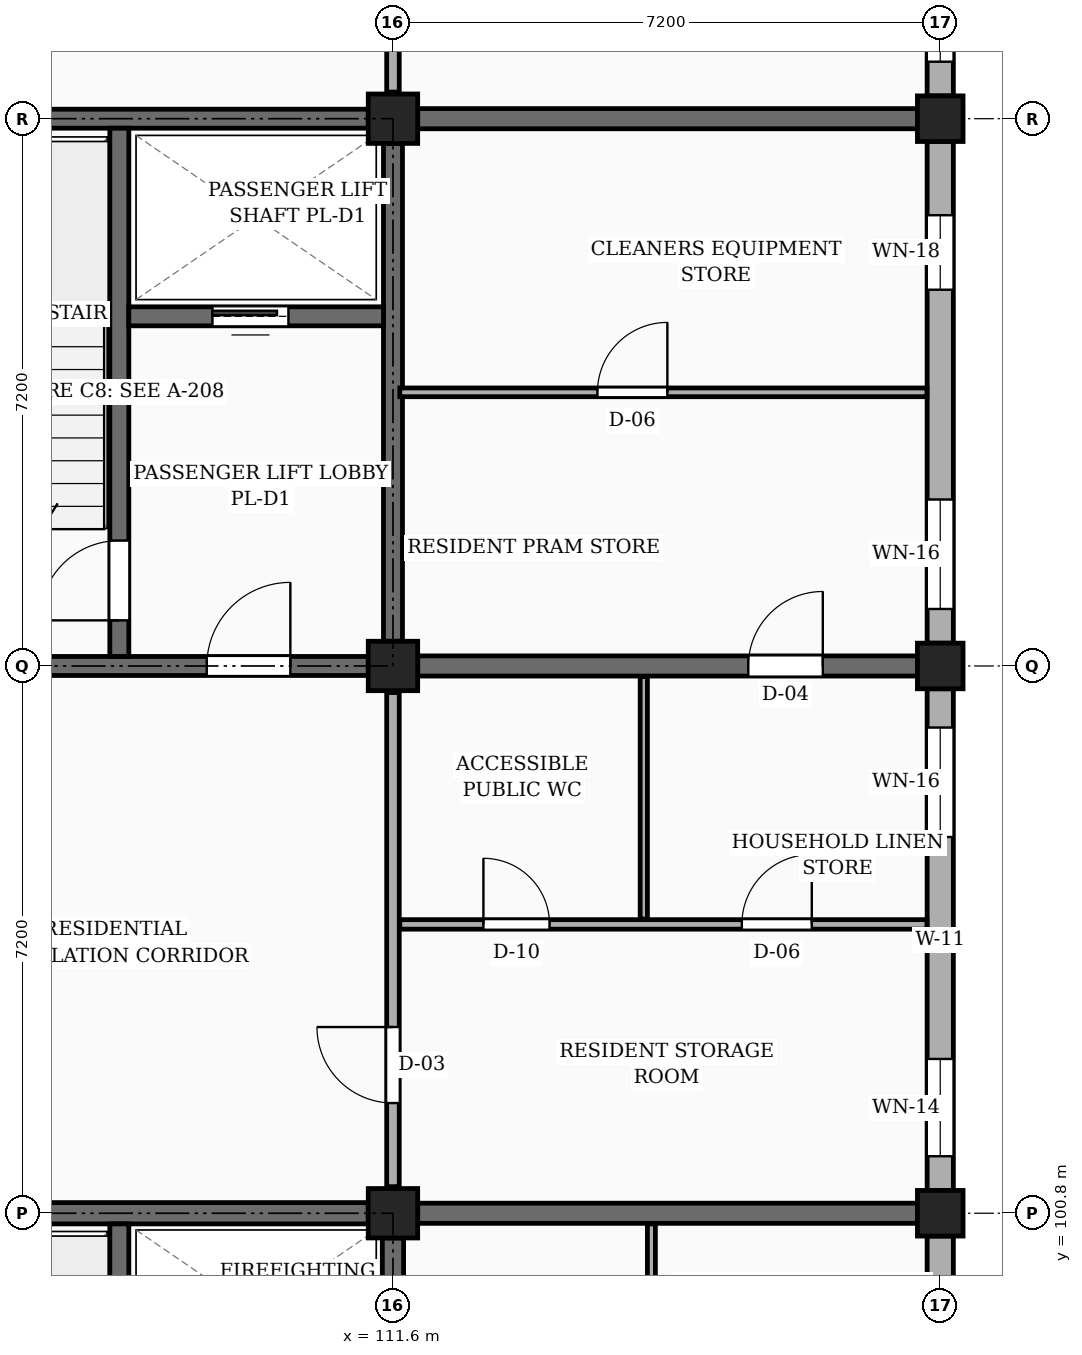
"""IFC4 building model, lengths in metres.
Left out: names, types, materials, properties, quantities, classifications, styles, units other than length and angle.
Written with IfcOpenShell. Run it as: python <this file> out.ifc"""

import sys

from ifc_helpers import new_model, si_unit, direction, frame, frame_2d, origin, origin_2d, place, context, subcontext, project, spatial, rectangle, extrude, element, fill, save


model = new_model("IFC4")
c1 = context("Model", 3, precision=1e-05, world=origin(), true_north=direction((0.0, 1.0)))
c2 = subcontext(c1, "Body", "Model", "MODEL_VIEW")
j1 = project(units=[si_unit("LENGTHUNIT", "METRE"), si_unit("PLANEANGLEUNIT", "RADIAN")], contexts=[c1])
p1 = place(None, origin())
s1 = spatial("IfcSite", under=j1, at=p1, CompositionType="ELEMENT")
p2 = place(p1, origin())
s2 = spatial("IfcBuilding", under=s1, at=p2, CompositionType="ELEMENT")
p3 = place(p2, frame((0.0, 0.0, 4.5)))
s3 = spatial("IfcBuildingStorey", under=s2, at=p3, CompositionType="ELEMENT", Elevation=4.5)
for number, where, z_axis, x_axis in (
    (1, (111.6, 100.8, 0.0), (0.0, 0.0, 1.0), (1.0, 0.0, 0.0)),
    (2, (111.6, 108.0, 0.0), (0.0, 0.0, 1.0), (1.0, 0.0, 0.0)),
    (3, (111.6, 115.2, 0.0), (0.0, 0.0, 1.0), (1.0, 0.0, 0.0)),
):
    element("IfcColumn", number, at=place(p3, frame(where, z_axis=z_axis, x_axis=x_axis)), inside=s3, PredefinedType="COLUMN", context=c2, shape_type="SweptSolid", body=[
        extrude(rectangle(XDim=0.65, YDim=0.65, at=origin_2d()), origin(), (0.0, 0.0, 1.0), 3.15),
    ])
for number, where, z_axis, x_axis in (
    (4, (118.8, 100.8, 0.0), (0.0, 0.0, 1.0), (1.0, 0.0, 0.0)),
    (5, (118.8, 108.0, 0.0), (0.0, 0.0, 1.0), (1.0, 0.0, 0.0)),
    (6, (118.8, 115.2, 0.0), (0.0, 0.0, 1.0), (1.0, 0.0, 0.0)),
):
    element("IfcColumn", number, at=place(p3, frame(where, z_axis=z_axis, x_axis=x_axis)), inside=s3, PredefinedType="COLUMN", context=c2, shape_type="SweptSolid", body=[
        extrude(rectangle(XDim=0.6, YDim=0.6, at=origin_2d()), origin(), (0.0, 0.0, 1.0), 3.15),
    ])
p4 = place(p3, frame((111.925, 100.8, 0.0), z_axis=(0.0, 0.0, 1.0), x_axis=(1.0, 0.0, 0.0)))
e7 = element("IfcWall", 7, at=p4, inside=s3, PredefinedType="SOLIDWALL", context=c2, shape_type="SweptSolid", body=[
    extrude(rectangle(XDim=6.575, YDim=0.265, at=frame_2d((3.288, 0.0))), origin(), (0.0, 0.0, 1.0), 2.19),
])
p5 = place(p3, frame((111.925, 108.0, 0.0), z_axis=(0.0, 0.0, 1.0), x_axis=(1.0, 0.0, 0.0)))
e8 = element("IfcWall", 8, at=p5, inside=s3, PredefinedType="SOLIDWALL", context=c2, shape_type="SweptSolid", body=[
    extrude(rectangle(XDim=6.575, YDim=0.265, at=frame_2d((3.288, 0.0))), origin(), (0.0, 0.0, 1.0), 2.19),
])
p6 = place(p5, frame((4.35, 0.0, 0.0)))
e9 = element("IfcOpeningElement", 9, at=p6, cuts=e8, PredefinedType="OPENING", context=c2, shape_type="SweptSolid", body=[
    extrude(rectangle(XDim=0.98, YDim=2.12, at=frame_2d((0.49, 1.06))), frame((0.0, 0.143, 0.0), z_axis=(0.0, -1.0, 0.0), x_axis=(1.0, 0.0, 0.0)), (0.0, 0.0, 1.0), 0.285),
])
p7 = place(p3, frame((111.925, 115.2, 0.0), z_axis=(0.0, 0.0, 1.0), x_axis=(1.0, 0.0, 0.0)))
e10 = element("IfcWall", 10, at=p7, inside=s3, PredefinedType="SOLIDWALL", context=c2, shape_type="SweptSolid", body=[
    extrude(rectangle(XDim=6.575, YDim=0.265, at=frame_2d((3.288, 0.0))), origin(), (0.0, 0.0, 1.0), 2.19),
])
p8 = place(p3, frame((118.8, 93.9, 0.0), z_axis=(0.0, 0.0, 1.0), x_axis=(0.0, 1.0, 0.0)))
e11 = element("IfcWall", 11, at=p8, inside=s3, PredefinedType="SOLIDWALL", context=c2, shape_type="SweptSolid", body=[
    extrude(rectangle(XDim=6.6, YDim=0.345, at=frame_2d((3.3, 0.0))), origin(), (0.0, 0.0, 1.0), 2.46),
])
p9 = place(p8, frame((0.45, 0.0, 0.78)))
e12 = element("IfcOpeningElement", 12, at=p9, cuts=e11, PredefinedType="OPENING", context=c2, shape_type="SweptSolid", body=[
    extrude(rectangle(XDim=1.12, YDim=1.26, at=frame_2d((0.56, 0.63))), frame((0.0, 0.183, 0.0), z_axis=(0.0, -1.0, 0.0), x_axis=(1.0, 0.0, 0.0)), (0.0, 0.0, 1.0), 0.365),
])
p10 = place(p8, frame((4.65, 0.0, 0.78)))
e13 = element("IfcOpeningElement", 13, at=p10, cuts=e11, PredefinedType="OPENING", context=c2, shape_type="SweptSolid", body=[
    extrude(rectangle(XDim=1.28, YDim=1.26, at=frame_2d((0.64, 0.63))), frame((0.0, 0.183, 0.0), z_axis=(0.0, -1.0, 0.0), x_axis=(1.0, 0.0, 0.0)), (0.0, 0.0, 1.0), 0.365),
])
p11 = place(p3, frame((118.8, 101.1, 0.0), z_axis=(0.0, 0.0, 1.0), x_axis=(0.0, 1.0, 0.0)))
e14 = element("IfcWall", 14, at=p11, inside=s3, PredefinedType="SOLIDWALL", context=c2, shape_type="SweptSolid", body=[
    extrude(rectangle(XDim=6.6, YDim=0.345, at=frame_2d((3.3, 0.0))), origin(), (0.0, 0.0, 1.0), 2.46),
])
p12 = place(p11, frame((0.45, 0.0, 0.78)))
e15 = element("IfcOpeningElement", 15, at=p12, cuts=e14, PredefinedType="OPENING", context=c2, shape_type="SweptSolid", body=[
    extrude(rectangle(XDim=1.28, YDim=1.26, at=frame_2d((0.64, 0.63))), frame((0.0, 0.183, 0.0), z_axis=(0.0, -1.0, 0.0), x_axis=(1.0, 0.0, 0.0)), (0.0, 0.0, 1.0), 0.365),
])
p13 = place(p11, frame((4.65, 0.0, 0.78)))
e16 = element("IfcOpeningElement", 16, at=p13, cuts=e14, PredefinedType="OPENING", context=c2, shape_type="SweptSolid", body=[
    extrude(rectangle(XDim=1.44, YDim=1.26, at=frame_2d((0.72, 0.63))), frame((0.0, 0.183, 0.0), z_axis=(0.0, -1.0, 0.0), x_axis=(1.0, 0.0, 0.0)), (0.0, 0.0, 1.0), 0.365),
])
p14 = place(p3, frame((118.8, 108.3, 0.0), z_axis=(0.0, 0.0, 1.0), x_axis=(0.0, 1.0, 0.0)))
e17 = element("IfcWall", 17, at=p14, inside=s3, PredefinedType="SOLIDWALL", context=c2, shape_type="SweptSolid", body=[
    extrude(rectangle(XDim=6.6, YDim=0.345, at=frame_2d((3.3, 0.0))), origin(), (0.0, 0.0, 1.0), 2.46),
])
p15 = place(p14, frame((0.45, 0.0, 0.78)))
e18 = element("IfcOpeningElement", 18, at=p15, cuts=e17, PredefinedType="OPENING", context=c2, shape_type="SweptSolid", body=[
    extrude(rectangle(XDim=1.44, YDim=1.26, at=frame_2d((0.72, 0.63))), frame((0.0, 0.183, 0.0), z_axis=(0.0, -1.0, 0.0), x_axis=(1.0, 0.0, 0.0)), (0.0, 0.0, 1.0), 0.365),
])
p16 = place(p14, frame((4.65, 0.0, 0.78)))
e19 = element("IfcOpeningElement", 19, at=p16, cuts=e17, PredefinedType="OPENING", context=c2, shape_type="SweptSolid", body=[
    extrude(rectangle(XDim=0.98, YDim=1.36, at=frame_2d((0.49, 0.68))), frame((0.0, 0.183, 0.0), z_axis=(0.0, -1.0, 0.0), x_axis=(1.0, 0.0, 0.0)), (0.0, 0.0, 1.0), 0.365),
])
p17 = place(p3, frame((118.8, 115.5, 0.0), z_axis=(0.0, 0.0, 1.0), x_axis=(0.0, 1.0, 0.0)))
e20 = element("IfcWall", 20, at=p17, inside=s3, PredefinedType="SOLIDWALL", context=c2, shape_type="SweptSolid", body=[
    extrude(rectangle(XDim=6.6, YDim=0.345, at=frame_2d((3.3, 0.0))), origin(), (0.0, 0.0, 1.0), 2.46),
])
p18 = place(p17, frame((0.45, 0.0, 0.78)))
e21 = element("IfcOpeningElement", 21, at=p18, cuts=e20, PredefinedType="OPENING", context=c2, shape_type="SweptSolid", body=[
    extrude(rectangle(XDim=0.98, YDim=1.36, at=frame_2d((0.49, 0.68))), frame((0.0, 0.183, 0.0), z_axis=(0.0, -1.0, 0.0), x_axis=(1.0, 0.0, 0.0)), (0.0, 0.0, 1.0), 0.365),
])
p19 = place(p17, frame((4.65, 0.0, 0.78)))
e22 = element("IfcOpeningElement", 22, at=p19, cuts=e20, PredefinedType="OPENING", context=c2, shape_type="SweptSolid", body=[
    extrude(rectangle(XDim=1.14, YDim=1.36, at=frame_2d((0.57, 0.68))), frame((0.0, 0.183, 0.0), z_axis=(0.0, -1.0, 0.0), x_axis=(1.0, 0.0, 0.0)), (0.0, 0.0, 1.0), 0.365),
])
p20 = place(p3, frame((104.725, 100.8, 0.0), z_axis=(0.0, 0.0, 1.0), x_axis=(1.0, 0.0, 0.0)))
e23 = element("IfcWall", 23, at=p20, inside=s3, PredefinedType="SHEAR", context=c2, shape_type="SweptSolid", body=[
    extrude(rectangle(XDim=6.55, YDim=0.28, at=frame_2d((3.275, 0.0))), origin(), (0.0, 0.0, 1.0), 2.89),
])
p21 = place(p3, frame((111.6, 93.925, 0.0), z_axis=(0.0, 0.0, 1.0), x_axis=(0.0, 1.0, 0.0)))
e24 = element("IfcWall", 24, at=p21, inside=s3, PredefinedType="SHEAR", context=c2, shape_type="SweptSolid", body=[
    extrude(rectangle(XDim=6.55, YDim=0.28, at=frame_2d((3.275, 0.0))), origin(), (0.0, 0.0, 1.0), 2.89),
])
p22 = place(p3, frame((108.0, 93.74, 0.0), z_axis=(0.0, 0.0, 1.0), x_axis=(0.0, 1.0, 0.0)))
e25 = element("IfcWall", 25, at=p22, inside=s3, PredefinedType="SHEAR", context=c2, shape_type="SweptSolid", body=[
    extrude(rectangle(XDim=6.92, YDim=0.25, at=frame_2d((3.46, 0.0))), origin(), (0.0, 0.0, 1.0), 2.89),
])
p23 = place(p22, frame((0.46, 0.0, 0.0)))
e26 = element("IfcOpeningElement", 26, at=p23, cuts=e25, PredefinedType="OPENING", context=c2, shape_type="SweptSolid", body=[
    extrude(rectangle(XDim=1.05, YDim=2.15, at=frame_2d((0.525, 1.075))), frame((0.0, 0.135, 0.0), z_axis=(0.0, -1.0, 0.0), x_axis=(1.0, 0.0, 0.0)), (0.0, 0.0, 1.0), 0.27),
])
p24 = place(p3, frame((104.725, 115.2, 0.0), z_axis=(0.0, 0.0, 1.0), x_axis=(1.0, 0.0, 0.0)))
e27 = element("IfcWall", 27, at=p24, inside=s3, PredefinedType="SHEAR", context=c2, shape_type="SweptSolid", body=[
    extrude(rectangle(XDim=6.55, YDim=0.25, at=frame_2d((3.275, 0.0))), origin(), (0.0, 0.0, 1.0), 2.89),
])
p25 = place(p3, frame((111.6, 108.325, 0.0), z_axis=(0.0, 0.0, 1.0), x_axis=(0.0, 1.0, 0.0)))
e28 = element("IfcWall", 28, at=p25, inside=s3, PredefinedType="SHEAR", context=c2, shape_type="SweptSolid", body=[
    extrude(rectangle(XDim=6.55, YDim=0.25, at=frame_2d((3.275, 0.0))), origin(), (0.0, 0.0, 1.0), 2.89),
])
p26 = place(p3, frame((104.725, 108.0, 0.0), z_axis=(0.0, 0.0, 1.0), x_axis=(1.0, 0.0, 0.0)))
e29 = element("IfcWall", 29, at=p26, inside=s3, PredefinedType="SHEAR", context=c2, shape_type="SweptSolid", body=[
    extrude(rectangle(XDim=6.55, YDim=0.25, at=frame_2d((3.275, 0.0))), origin(), (0.0, 0.0, 1.0), 2.89),
])
p27 = place(p26, frame((4.425, 0.0, 0.0)))
e30 = element("IfcOpeningElement", 30, at=p27, cuts=e29, PredefinedType="OPENING", context=c2, shape_type="SweptSolid", body=[
    extrude(rectangle(XDim=1.1, YDim=2.15, at=frame_2d((0.55, 1.075))), frame((0.0, 0.135, 0.0), z_axis=(0.0, -1.0, 0.0), x_axis=(1.0, 0.0, 0.0)), (0.0, 0.0, 1.0), 0.27),
])
p28 = place(p3, frame((108.0, 108.125, 0.0), z_axis=(0.0, 0.0, 1.0), x_axis=(0.0, 1.0, 0.0)))
e31 = element("IfcWall", 31, at=p28, inside=s3, PredefinedType="SHEAR", context=c2, shape_type="SweptSolid", body=[
    extrude(rectangle(XDim=6.95, YDim=0.25, at=frame_2d((3.475, 0.0))), origin(), (0.0, 0.0, 1.0), 2.89),
])
p29 = place(p28, frame((0.475, 0.0, 0.0)))
e32 = element("IfcOpeningElement", 32, at=p29, cuts=e31, PredefinedType="OPENING", context=c2, shape_type="SweptSolid", body=[
    extrude(rectangle(XDim=1.05, YDim=2.15, at=frame_2d((0.525, 1.075))), frame((0.0, 0.135, 0.0), z_axis=(0.0, -1.0, 0.0), x_axis=(1.0, 0.0, 0.0)), (0.0, 0.0, 1.0), 0.27),
])
p30 = place(p3, frame((108.125, 112.6, 0.0), z_axis=(0.0, 0.0, 1.0), x_axis=(1.0, 0.0, 0.0)))
e33 = element("IfcWall", 33, at=p30, inside=s3, PredefinedType="SHEAR", context=c2, shape_type="SweptSolid", body=[
    extrude(rectangle(XDim=3.35, YDim=0.25, at=frame_2d((1.675, 0.0))), origin(), (0.0, 0.0, 1.0), 2.89),
])
p31 = place(p30, frame((1.1, 0.0, 0.0)))
e34 = element("IfcOpeningElement", 34, at=p31, cuts=e33, PredefinedType="OPENING", context=c2, shape_type="SweptSolid", body=[
    extrude(rectangle(XDim=1.0, YDim=2.2, at=frame_2d((0.5, 1.1))), frame((0.0, 0.135, 0.0), z_axis=(0.0, -1.0, 0.0), x_axis=(1.0, 0.0, 0.0)), (0.0, 0.0, 1.0), 0.27),
])
p32 = place(p3, frame((111.6, 101.15, 0.0), z_axis=(0.0, 0.0, 1.0), x_axis=(0.0, 1.0, 0.0)))
e35 = element("IfcWall", 35, at=p32, inside=s3, PredefinedType="PARTITIONING", context=c2, shape_type="SweptSolid", body=[
    extrude(rectangle(XDim=6.5, YDim=0.165, at=frame_2d((3.25, 0.0))), origin(), (0.0, 0.0, 1.0), 2.24),
])
p33 = place(p32, frame((1.1, 0.0, 0.0)))
e36 = element("IfcOpeningElement", 36, at=p33, cuts=e35, PredefinedType="OPENING", context=c2, shape_type="SweptSolid", body=[
    extrude(rectangle(XDim=1.0, YDim=2.15, at=frame_2d((0.5, 1.075))), frame((0.0, 0.093, 0.0), z_axis=(0.0, -1.0, 0.0), x_axis=(1.0, 0.0, 0.0)), (0.0, 0.0, 1.0), 0.185),
])
p34 = place(p3, frame((111.6, 115.55, 0.0), z_axis=(0.0, 0.0, 1.0), x_axis=(0.0, 1.0, 0.0)))
e37 = element("IfcWall", 37, at=p34, inside=s3, PredefinedType="PARTITIONING", context=c2, shape_type="SweptSolid", body=[
    extrude(rectangle(XDim=6.5, YDim=0.165, at=frame_2d((3.25, 0.0))), origin(), (0.0, 0.0, 1.0), 2.24),
])
p35 = place(p34, frame((1.1, 0.0, 0.0)))
e38 = element("IfcOpeningElement", 38, at=p35, cuts=e37, PredefinedType="OPENING", context=c2, shape_type="SweptSolid", body=[
    extrude(rectangle(XDim=0.94, YDim=2.12, at=frame_2d((0.47, 1.06))), frame((0.0, 0.093, 0.0), z_axis=(0.0, -1.0, 0.0), x_axis=(1.0, 0.0, 0.0)), (0.0, 0.0, 1.0), 0.185),
])
p36 = place(p3, frame((115.0, 96.97, 0.0), z_axis=(0.0, 0.0, 1.0), x_axis=(0.0, 1.0, 0.0)))
e39 = element("IfcWall", 39, at=p36, inside=s3, PredefinedType="PARTITIONING", context=c2, shape_type="SweptSolid", body=[
    extrude(rectangle(XDim=3.69, YDim=0.105, at=frame_2d((1.845, 0.0))), origin(), (0.0, 0.0, 1.0), 2.325),
])
p37 = place(p3, frame((111.69, 104.6, 0.0), z_axis=(0.0, 0.0, 1.0), x_axis=(1.0, 0.0, 0.0)))
e40 = element("IfcWall", 40, at=p37, inside=s3, PredefinedType="PARTITIONING", context=c2, shape_type="SweptSolid", body=[
    extrude(rectangle(XDim=6.935, YDim=0.125, at=frame_2d((3.468, 0.0))), origin(), (0.0, 0.0, 1.0), 2.325),
])
p38 = place(p37, frame((1.1, 0.0, 0.0)))
e41 = element("IfcOpeningElement", 41, at=p38, cuts=e40, PredefinedType="OPENING", context=c2, shape_type="SweptSolid", body=[
    extrude(rectangle(XDim=0.87, YDim=2.05, at=frame_2d((0.435, 1.025))), frame((0.0, 0.073, 0.0), z_axis=(0.0, -1.0, 0.0), x_axis=(1.0, 0.0, 0.0)), (0.0, 0.0, 1.0), 0.145),
])
p39 = place(p37, frame((4.5, 0.0, 0.0)))
e42 = element("IfcOpeningElement", 42, at=p39, cuts=e40, PredefinedType="OPENING", context=c2, shape_type="SweptSolid", body=[
    extrude(rectangle(XDim=0.92, YDim=2.1, at=frame_2d((0.46, 1.05))), frame((0.0, 0.073, 0.0), z_axis=(0.0, -1.0, 0.0), x_axis=(1.0, 0.0, 0.0)), (0.0, 0.0, 1.0), 0.145),
])
p40 = place(p3, frame((114.9, 104.67, 0.0), z_axis=(0.0, 0.0, 1.0), x_axis=(0.0, 1.0, 0.0)))
e43 = element("IfcWall", 43, at=p40, inside=s3, PredefinedType="PARTITIONING", context=c2, shape_type="SweptSolid", body=[
    extrude(rectangle(XDim=3.19, YDim=0.095, at=frame_2d((1.595, 0.0))), origin(), (0.0, 0.0, 1.0), 2.325),
])
p41 = place(p3, frame((111.69, 111.6, 0.0), z_axis=(0.0, 0.0, 1.0), x_axis=(1.0, 0.0, 0.0)))
e44 = element("IfcWall", 44, at=p41, inside=s3, PredefinedType="PARTITIONING", context=c2, shape_type="SweptSolid", body=[
    extrude(rectangle(XDim=6.935, YDim=0.115, at=frame_2d((3.468, 0.0))), origin(), (0.0, 0.0, 1.0), 2.325),
])
p42 = place(p41, frame((2.6, 0.0, 0.0)))
e45 = element("IfcOpeningElement", 45, at=p42, cuts=e44, PredefinedType="OPENING", context=c2, shape_type="SweptSolid", body=[
    extrude(rectangle(XDim=0.92, YDim=2.1, at=frame_2d((0.46, 1.05))), frame((0.0, 0.067, 0.0), z_axis=(0.0, -1.0, 0.0), x_axis=(1.0, 0.0, 0.0)), (0.0, 0.0, 1.0), 0.135),
])
p43 = place(p12, origin())
e46 = element("IfcWindow", 46, at=p43, inside=s3, PartitioningType="SINGLE_PANEL", PredefinedType="WINDOW", context=c2, shape_type="SweptSolid", body=[
    extrude(rectangle(XDim=1.28, YDim=1.26, at=frame_2d((0.64, 0.63))), frame((0.0, 0.03, 0.0), z_axis=(0.0, -1.0, 0.0), x_axis=(1.0, 0.0, 0.0)), (0.0, 0.0, 1.0), 0.06),
])
fill(e15, e46)
p44 = place(p13, origin())
e47 = element("IfcWindow", 47, at=p44, inside=s3, PartitioningType="SINGLE_PANEL", PredefinedType="WINDOW", context=c2, shape_type="SweptSolid", body=[
    extrude(rectangle(XDim=1.44, YDim=1.26, at=frame_2d((0.72, 0.63))), frame((0.0, 0.03, 0.0), z_axis=(0.0, -1.0, 0.0), x_axis=(1.0, 0.0, 0.0)), (0.0, 0.0, 1.0), 0.06),
])
fill(e16, e47)
p45 = place(p15, origin())
e48 = element("IfcWindow", 48, at=p45, inside=s3, PartitioningType="SINGLE_PANEL", PredefinedType="WINDOW", context=c2, shape_type="SweptSolid", body=[
    extrude(rectangle(XDim=1.44, YDim=1.26, at=frame_2d((0.72, 0.63))), frame((0.0, 0.03, 0.0), z_axis=(0.0, -1.0, 0.0), x_axis=(1.0, 0.0, 0.0)), (0.0, 0.0, 1.0), 0.06),
])
fill(e18, e48)
p46 = place(p16, origin())
e49 = element("IfcWindow", 49, at=p46, inside=s3, PartitioningType="SINGLE_PANEL", PredefinedType="WINDOW", context=c2, shape_type="SweptSolid", body=[
    extrude(rectangle(XDim=0.98, YDim=1.36, at=frame_2d((0.49, 0.68))), frame((0.0, 0.03, 0.0), z_axis=(0.0, -1.0, 0.0), x_axis=(1.0, 0.0, 0.0)), (0.0, 0.0, 1.0), 0.06),
])
fill(e19, e49)
p47 = place(p18, origin())
e50 = element("IfcWindow", 50, at=p47, inside=s3, PartitioningType="SINGLE_PANEL", PredefinedType="WINDOW", context=c2, shape_type="SweptSolid", body=[
    extrude(rectangle(XDim=0.98, YDim=1.36, at=frame_2d((0.49, 0.68))), frame((0.0, 0.03, 0.0), z_axis=(0.0, -1.0, 0.0), x_axis=(1.0, 0.0, 0.0)), (0.0, 0.0, 1.0), 0.06),
])
fill(e21, e50)
p48 = place(p27, frame((1.1, 0.0, 0.0), z_axis=(0.0, 0.0, 1.0), x_axis=(-1.0, 0.0, 0.0)))
e51 = element("IfcDoor", 51, at=p48, inside=s3, OperationType="SINGLE_SWING_RIGHT", PredefinedType="DOOR", context=c2, shape_type="SweptSolid", body=[
    extrude(rectangle(XDim=1.1, YDim=2.15, at=frame_2d((0.55, 1.075))), frame((0.0, 0.025, 0.0), z_axis=(0.0, -1.0, 0.0), x_axis=(1.0, 0.0, 0.0)), (0.0, 0.0, 1.0), 0.05),
])
fill(e30, e51)
p49 = place(p29, origin())
e52 = element("IfcDoor", 52, at=p49, inside=s3, OperationType="SINGLE_SWING_LEFT", PredefinedType="DOOR", context=c2, shape_type="SweptSolid", body=[
    extrude(rectangle(XDim=1.05, YDim=2.15, at=frame_2d((0.525, 1.075))), frame((0.0, 0.025, 0.0), z_axis=(0.0, -1.0, 0.0), x_axis=(1.0, 0.0, 0.0)), (0.0, 0.0, 1.0), 0.05),
])
fill(e32, e52)
p50 = place(p31, origin())
e53 = element("IfcDoor", 53, at=p50, inside=s3, OperationType="SLIDING_TO_LEFT", PredefinedType="DOOR", context=c2, shape_type="SweptSolid", body=[
    extrude(rectangle(XDim=1.0, YDim=2.2, at=frame_2d((0.5, 1.1))), frame((0.0, 0.025, 0.0), z_axis=(0.0, -1.0, 0.0), x_axis=(1.0, 0.0, 0.0)), (0.0, 0.0, 1.0), 0.05),
])
fill(e34, e53)
p51 = place(p33, origin())
e54 = element("IfcDoor", 54, at=p51, inside=s3, OperationType="SINGLE_SWING_RIGHT", PredefinedType="DOOR", context=c2, shape_type="SweptSolid", body=[
    extrude(rectangle(XDim=1.0, YDim=2.15, at=frame_2d((0.5, 1.075))), frame((0.0, 0.025, 0.0), z_axis=(0.0, -1.0, 0.0), x_axis=(1.0, 0.0, 0.0)), (0.0, 0.0, 1.0), 0.05),
])
fill(e36, e54)
p52 = place(p38, origin())
e55 = element("IfcDoor", 55, at=p52, inside=s3, OperationType="SINGLE_SWING_LEFT", PredefinedType="DOOR", context=c2, shape_type="SweptSolid", body=[
    extrude(rectangle(XDim=0.87, YDim=2.05, at=frame_2d((0.435, 1.025))), frame((0.0, 0.025, 0.0), z_axis=(0.0, -1.0, 0.0), x_axis=(1.0, 0.0, 0.0)), (0.0, 0.0, 1.0), 0.05),
])
fill(e41, e55)
p53 = place(p39, origin())
e56 = element("IfcDoor", 56, at=p53, inside=s3, OperationType="SINGLE_SWING_RIGHT", PredefinedType="DOOR", context=c2, shape_type="SweptSolid", body=[
    extrude(rectangle(XDim=0.92, YDim=2.1, at=frame_2d((0.46, 1.05))), frame((0.0, 0.025, 0.0), z_axis=(0.0, -1.0, 0.0), x_axis=(1.0, 0.0, 0.0)), (0.0, 0.0, 1.0), 0.05),
])
fill(e42, e56)
p54 = place(p42, origin())
e57 = element("IfcDoor", 57, at=p54, inside=s3, OperationType="SINGLE_SWING_RIGHT", PredefinedType="DOOR", context=c2, shape_type="SweptSolid", body=[
    extrude(rectangle(XDim=0.92, YDim=2.1, at=frame_2d((0.46, 1.05))), frame((0.0, 0.025, 0.0), z_axis=(0.0, -1.0, 0.0), x_axis=(1.0, 0.0, 0.0)), (0.0, 0.0, 1.0), 0.05),
])
fill(e45, e57)
p55 = place(p6, origin())
e58 = element("IfcDoor", 58, at=p55, inside=s3, OperationType="SINGLE_SWING_RIGHT", PredefinedType="DOOR", context=c2, shape_type="SweptSolid", body=[
    extrude(rectangle(XDim=0.98, YDim=2.12, at=frame_2d((0.49, 1.06))), frame((0.0, 0.025, 0.0), z_axis=(0.0, -1.0, 0.0), x_axis=(1.0, 0.0, 0.0)), (0.0, 0.0, 1.0), 0.05),
])
fill(e9, e58)
save(model, sys.argv[1])
